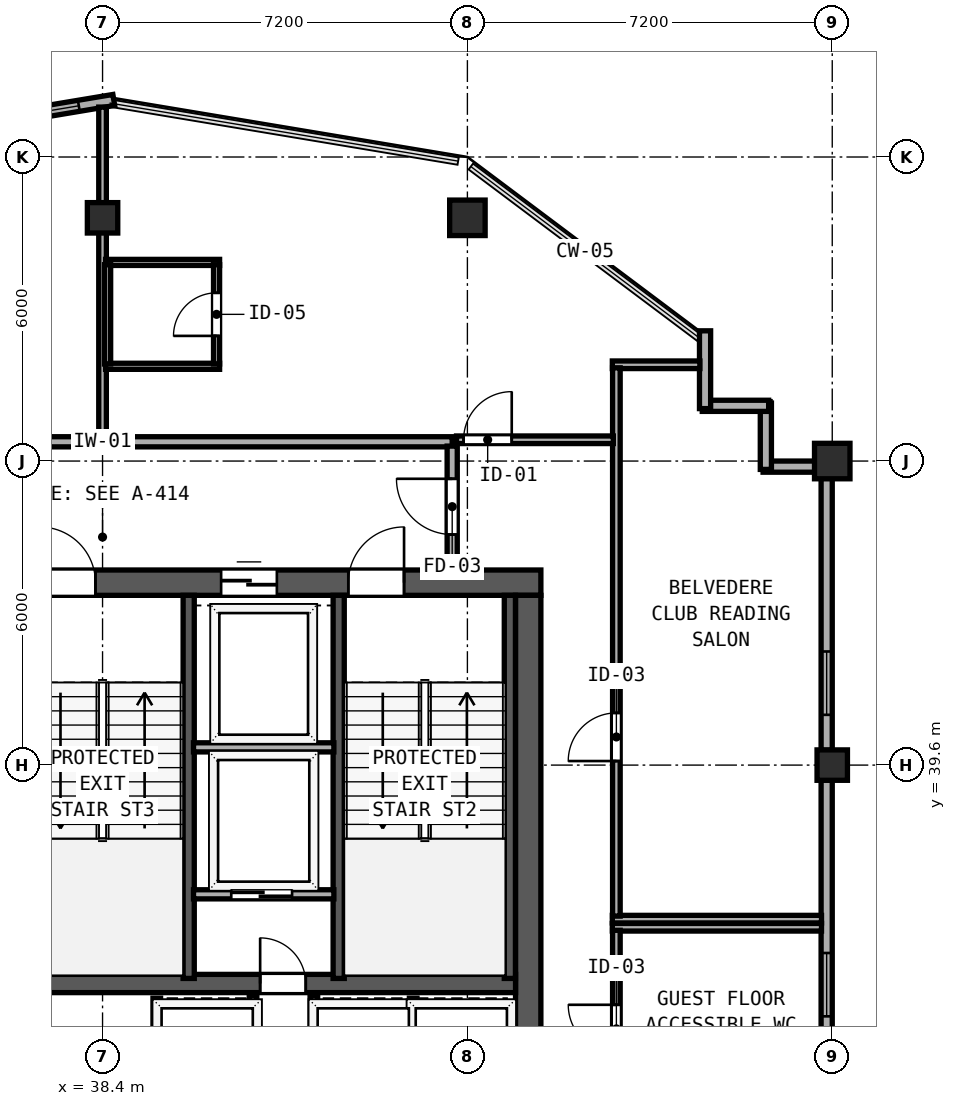
"""IFC4 building model, lengths in metres.
Left out: names, types, materials, properties, quantities, classifications, styles, units other than length and angle.
Written with IfcOpenShell. Run it as: python <this file> out.ifc"""

import sys

from ifc_helpers import new_model, si_unit, direction, frame, frame_2d, origin, origin_2d, place, context, subcontext, project, spatial, rectangle, hollow_rectangle, extrude, element, fill, save


model = new_model("IFC4")
c1 = context("Model", 3, precision=1e-05, world=origin(), true_north=direction((0.0, 1.0)))
c2 = subcontext(c1, "Body", "Model", "MODEL_VIEW")
j1 = project(units=[si_unit("LENGTHUNIT", "METRE"), si_unit("PLANEANGLEUNIT", "RADIAN")], contexts=[c1])
p1 = place(None, origin())
s1 = spatial("IfcSite", under=j1, at=p1, CompositionType="ELEMENT")
p2 = place(p1, origin())
s2 = spatial("IfcBuilding", under=s1, at=p2, CompositionType="ELEMENT")
p3 = place(p2, frame((0.0, 0.0, 301.7)))
s3 = spatial("IfcBuildingStorey", under=s2, at=p3, CompositionType="ELEMENT", Elevation=301.7)
p4 = place(p3, frame((29.75, 43.2, 0.0), z_axis=(0.0, 0.0, 1.0), x_axis=(1.0, 0.0, 0.0)))
e1 = element("IfcWall", 1, at=p4, inside=s3, PredefinedType="SHEAR", context=c2, shape_type="SweptSolid", body=[
    extrude(rectangle(XDim=17.3, YDim=0.5, at=frame_2d((8.65, 0.0))), origin(), (0.0, 0.0, 1.0), 3.72),
])
p5 = place(p4, frame((2.3, 0.0, 0.0)))
e2 = element("IfcOpeningElement", 2, at=p5, cuts=e1, PredefinedType="OPENING", context=c2, shape_type="SweptSolid", body=[
    extrude(rectangle(XDim=1.1, YDim=2.15, at=frame_2d((0.55, 1.075))), frame((0.0, 0.26, 0.0), z_axis=(0.0, -1.0, 0.0), x_axis=(1.0, 0.0, 0.0)), (0.0, 0.0, 1.0), 0.52),
])
p6 = place(p4, frame((7.41, 0.0, 0.0)))
e3 = element("IfcOpeningElement", 3, at=p6, cuts=e1, PredefinedType="OPENING", context=c2, shape_type="SweptSolid", body=[
    extrude(rectangle(XDim=1.1, YDim=2.15, at=frame_2d((0.55, 1.075))), frame((0.0, 0.26, 0.0), z_axis=(0.0, -1.0, 0.0), x_axis=(1.0, 0.0, 0.0)), (0.0, 0.0, 1.0), 0.52),
])
p7 = place(p4, frame((13.5, 0.0, 0.0)))
e4 = element("IfcOpeningElement", 4, at=p7, cuts=e1, PredefinedType="OPENING", context=c2, shape_type="SweptSolid", body=[
    extrude(rectangle(XDim=1.1, YDim=2.15, at=frame_2d((0.55, 1.075))), frame((0.0, 0.26, 0.0), z_axis=(0.0, -1.0, 0.0), x_axis=(1.0, 0.0, 0.0)), (0.0, 0.0, 1.0), 0.52),
])
p8 = place(p4, frame((4.63, 0.0, 0.0)))
e5 = element("IfcOpeningElement", 5, at=p8, cuts=e1, PredefinedType="OPENING", context=c2, shape_type="SweptSolid", body=[
    extrude(rectangle(XDim=1.1, YDim=2.2, at=frame_2d((0.55, 1.1))), frame((0.0, 0.26, 0.0), z_axis=(0.0, -1.0, 0.0), x_axis=(1.0, 0.0, 0.0)), (0.0, 0.0, 1.0), 0.52),
])
p9 = place(p4, frame((10.99, 0.0, 0.0)))
e6 = element("IfcOpeningElement", 6, at=p9, cuts=e1, PredefinedType="OPENING", context=c2, shape_type="SweptSolid", body=[
    extrude(rectangle(XDim=1.1, YDim=2.2, at=frame_2d((0.55, 1.1))), frame((0.0, 0.26, 0.0), z_axis=(0.0, -1.0, 0.0), x_axis=(1.0, 0.0, 0.0)), (0.0, 0.0, 1.0), 0.52),
])
p10 = place(p3, frame((46.8, 32.8, 0.0), z_axis=(0.0, 0.0, 1.0), x_axis=(0.0, 1.0, 0.0)))
e7 = element("IfcWall", 7, at=p10, inside=s3, PredefinedType="SHEAR", context=c2, shape_type="SweptSolid", body=[
    extrude(rectangle(XDim=10.15, YDim=0.5, at=frame_2d((5.075, 0.0))), origin(), (0.0, 0.0, 1.0), 3.72),
])
p11 = place(p3, frame((30.25, 35.29, 0.0), z_axis=(0.0, 0.0, 1.0), x_axis=(1.0, 0.0, 0.0)))
e8 = element("IfcWall", 8, at=p11, inside=s3, PredefinedType="SHEAR", context=c2, shape_type="SweptSolid", body=[
    extrude(rectangle(XDim=16.3, YDim=0.36, at=frame_2d((8.15, 0.0))), origin(), (0.0, 0.0, 1.0), 3.72),
])
p12 = place(p11, frame((5.1, 0.0, 0.0), z_axis=(0.0, 0.0, 1.0), x_axis=(-1.0, 0.0, 0.0)))
e9 = element("IfcOpeningElement", 9, at=p12, cuts=e8, PredefinedType="OPENING", context=c2, shape_type="SweptSolid", body=[
    extrude(rectangle(XDim=0.9, YDim=2.1, at=frame_2d((0.45, 1.05))), frame((0.0, 0.19, 0.0), z_axis=(0.0, -1.0, 0.0), x_axis=(1.0, 0.0, 0.0)), (0.0, 0.0, 1.0), 0.38),
])
p13 = place(p11, frame((12.16, 0.0, 0.0), z_axis=(0.0, 0.0, 1.0), x_axis=(-1.0, 0.0, 0.0)))
e10 = element("IfcOpeningElement", 10, at=p13, cuts=e8, PredefinedType="OPENING", context=c2, shape_type="SweptSolid", body=[
    extrude(rectangle(XDim=0.9, YDim=2.1, at=frame_2d((0.45, 1.05))), frame((0.0, 0.19, 0.0), z_axis=(0.0, -1.0, 0.0), x_axis=(1.0, 0.0, 0.0)), (0.0, 0.0, 1.0), 0.38),
])
for number, where, z_axis, x_axis in (
    (11, (40.1, 35.39, 0.0), (0.0, 0.0, 1.0), (0.0, 1.0, 0.0)),
    (12, (43.06, 35.39, 0.0), (0.0, 0.0, 1.0), (0.0, 1.0, 0.0)),
    (13, (46.438, 35.39, 0.0), (0.0, 0.0, 1.0), (0.0, 1.0, 0.0)),
):
    element("IfcWall", number, at=place(p3, frame(where, z_axis=z_axis, x_axis=x_axis)), inside=s3, PredefinedType="SHEAR", context=c2, shape_type="SweptSolid", body=[
        extrude(rectangle(XDim=7.56, YDim=0.22, at=frame_2d((3.78, 0.0))), origin(), (0.0, 0.0, 1.0), 3.72),
    ])
for number, where, z_axis, x_axis in (
    (14, (52.8, 45.6, 0.0), (0.0, 0.0, 1.0), (1.0, 0.0, 0.0)),
    (15, (45.6, 50.4, 0.0), (0.0, 0.0, 1.0), (1.0, 0.0, 0.0)),
):
    element("IfcColumn", number, at=place(p3, frame(where, z_axis=z_axis, x_axis=x_axis)), inside=s3, PredefinedType="COLUMN", context=c2, shape_type="SweptSolid", body=[
        extrude(hollow_rectangle(XDim=0.7, YDim=0.7, WallThickness=0.026, at=origin_2d()), origin(), (0.0, 0.0, 1.0), 3.9),
    ])
for number, where, z_axis, x_axis in (
    (16, (52.8, 39.6, 0.0), (0.0, 0.0, 1.0), (1.0, 0.0, 0.0)),
    (17, (38.4, 50.4, 0.0), (0.0, 0.0, 1.0), (1.0, 0.0, 0.0)),
):
    element("IfcColumn", number, at=place(p3, frame(where, z_axis=z_axis, x_axis=x_axis)), inside=s3, PredefinedType="COLUMN", context=c2, shape_type="SweptSolid", body=[
        extrude(hollow_rectangle(XDim=0.6, YDim=0.6, WallThickness=0.024, at=origin_2d()), origin(), (0.0, 0.0, 1.0), 3.9),
    ])
p14 = place(p3, frame((52.69, 33.942, 0.0), z_axis=(0.0, 0.0, 1.0), x_axis=(0.0, 1.0, 0.0)))
e18 = element("IfcWall", 18, at=p14, inside=s3, PredefinedType="SOLIDWALL", context=c2, shape_type="SweptSolid", body=[
    extrude(rectangle(XDim=5.366, YDim=0.22, at=frame_2d((2.683, 0.0))), origin(), (0.0, 0.0, 1.0), 3.365),
])
p15 = place(p14, frame((0.7, 0.0, 0.85)))
e19 = element("IfcOpeningElement", 19, at=p15, cuts=e18, PredefinedType="OPENING", context=c2, shape_type="SweptSolid", body=[
    extrude(rectangle(XDim=1.25, YDim=1.95, at=frame_2d((0.625, 0.975))), frame((0.0, 0.12, 0.0), z_axis=(0.0, -1.0, 0.0), x_axis=(1.0, 0.0, 0.0)), (0.0, 0.0, 1.0), 0.24),
])
p16 = place(p3, frame((52.69, 39.892, 0.0), z_axis=(0.0, 0.0, 1.0), x_axis=(0.0, 1.0, 0.0)))
e20 = element("IfcWall", 20, at=p16, inside=s3, PredefinedType="SOLIDWALL", context=c2, shape_type="SweptSolid", body=[
    extrude(rectangle(XDim=5.366, YDim=0.22, at=frame_2d((2.683, 0.0))), origin(), (0.0, 0.0, 1.0), 3.365),
])
p17 = place(p16, frame((0.7, 0.0, 0.85)))
e21 = element("IfcOpeningElement", 21, at=p17, cuts=e20, PredefinedType="OPENING", context=c2, shape_type="SweptSolid", body=[
    extrude(rectangle(XDim=1.25, YDim=1.95, at=frame_2d((0.625, 0.975))), frame((0.0, 0.12, 0.0), z_axis=(0.0, -1.0, 0.0), x_axis=(1.0, 0.0, 0.0)), (0.0, 0.0, 1.0), 0.24),
])
p18 = place(p3, frame((52.458, 45.49, 0.0), z_axis=(0.0, 0.0, 1.0), x_axis=(-1.0, 0.0, 0.0)))
e22 = element("IfcWall", 22, at=p18, inside=s3, PredefinedType="SOLIDWALL", context=c2, shape_type="SweptSolid", body=[
    extrude(rectangle(XDim=1.023, YDim=0.22, at=frame_2d((0.511, 0.0))), origin(), (0.0, 0.0, 1.0), 3.72),
])
p19 = place(p3, frame((51.49, 45.435, 0.0), z_axis=(0.0, 0.0, 1.0), x_axis=(0.0, 1.0, 0.0)))
e23 = element("IfcWall", 23, at=p19, inside=s3, PredefinedType="SOLIDWALL", context=c2, shape_type="SweptSolid", body=[
    extrude(rectangle(XDim=1.31, YDim=0.22, at=frame_2d((0.655, 0.0))), origin(), (0.0, 0.0, 1.0), 3.72),
])
p20 = place(p3, frame((51.545, 46.69, 0.0), z_axis=(0.0, 0.0, 1.0), x_axis=(-1.0, 0.0, 0.0)))
e24 = element("IfcWall", 24, at=p20, inside=s3, PredefinedType="SOLIDWALL", context=c2, shape_type="SweptSolid", body=[
    extrude(rectangle(XDim=1.31, YDim=0.22, at=frame_2d((0.655, 0.0))), origin(), (0.0, 0.0, 1.0), 3.72),
])
p21 = place(p3, frame((50.29, 46.635, 0.0), z_axis=(0.0, 0.0, 1.0), x_axis=(0.0, 1.0, 0.0)))
e25 = element("IfcWall", 25, at=p21, inside=s3, PredefinedType="SOLIDWALL", context=c2, shape_type="SweptSolid", body=[
    extrude(rectangle(XDim=1.535, YDim=0.22, at=frame_2d((0.768, 0.0))), origin(), (0.0, 0.0, 1.0), 3.72),
])
p22 = place(p3, frame((38.622, 52.726, 0.0), z_axis=(0.0, 0.0, 1.0), x_axis=(-0.986390420428, -0.164420006349, 0.0)))
e26 = element("IfcWall", 26, at=p22, inside=s3, PredefinedType="SOLIDWALL", context=c2, shape_type="SweptSolid", body=[
    extrude(rectangle(XDim=7.534, YDim=0.22, at=frame_2d((3.767, 0.0))), origin(), (0.0, 0.0, 1.0), 3.72),
])
p23 = place(p22, frame((0.7, 0.0, 0.85)))
e27 = element("IfcOpeningElement", 27, at=p23, cuts=e26, PredefinedType="OPENING", context=c2, shape_type="SweptSolid", body=[
    extrude(rectangle(XDim=1.25, YDim=1.95, at=frame_2d((0.625, 0.975))), frame((0.0, 0.12, 0.0), z_axis=(0.0, -1.0, 0.0), x_axis=(1.0, 0.0, 0.0)), (0.0, 0.0, 1.0), 0.24),
])
p24 = place(p3, frame((31.5, 45.98, 0.0), z_axis=(0.0, 0.0, 1.0), x_axis=(1.0, 0.0, 0.0)))
e28 = element("IfcWall", 28, at=p24, inside=s3, PredefinedType="SOLIDWALL", context=c2, shape_type="SweptSolid", body=[
    extrude(rectangle(XDim=13.8, YDim=0.2, at=frame_2d((6.9, 0.0))), origin(), (0.0, 0.0, 1.0), 3.72),
])
p25 = place(p3, frame((45.3, 43.45, 0.0), z_axis=(0.0, 0.0, 1.0), x_axis=(0.0, 1.0, 0.0)))
e29 = element("IfcWall", 29, at=p25, inside=s3, PredefinedType="SOLIDWALL", context=c2, shape_type="SweptSolid", body=[
    extrude(rectangle(XDim=2.445, YDim=0.2, at=frame_2d((1.223, 0.0))), origin(), (0.0, 0.0, 1.0), 3.72),
])
p26 = place(p25, frame((0.7, 0.0, 0.0)))
e30 = element("IfcOpeningElement", 30, at=p26, cuts=e29, PredefinedType="OPENING", context=c2, shape_type="SweptSolid", body=[
    extrude(rectangle(XDim=1.1, YDim=2.15, at=frame_2d((0.55, 1.075))), frame((0.0, 0.11, 0.0), z_axis=(0.0, -1.0, 0.0), x_axis=(1.0, 0.0, 0.0)), (0.0, 0.0, 1.0), 0.22),
])
p27 = place(p3, frame((40.195, 39.95, 0.0), z_axis=(0.0, 0.0, 1.0), x_axis=(1.0, 0.0, 0.0)))
e31 = element("IfcWall", 31, at=p27, inside=s3, PredefinedType="SOLIDWALL", context=c2, shape_type="SweptSolid", body=[
    extrude(rectangle(XDim=2.77, YDim=0.18, at=frame_2d((1.385, 0.0))), origin(), (0.0, 0.0, 1.0), 3.72),
])
p28 = place(p3, frame((40.195, 37.05, 0.0), z_axis=(0.0, 0.0, 1.0), x_axis=(1.0, 0.0, 0.0)))
e32 = element("IfcWall", 32, at=p28, inside=s3, PredefinedType="SOLIDWALL", context=c2, shape_type="SweptSolid", body=[
    extrude(rectangle(XDim=2.77, YDim=0.18, at=frame_2d((1.385, 0.0))), origin(), (0.0, 0.0, 1.0), 3.72),
])
p29 = place(p28, frame((1.945, 0.0, 0.0), z_axis=(0.0, 0.0, 1.0), x_axis=(-1.0, 0.0, 0.0)))
e33 = element("IfcOpeningElement", 33, at=p29, cuts=e32, PredefinedType="OPENING", context=c2, shape_type="SweptSolid", body=[
    extrude(rectangle(XDim=1.2, YDim=2.2, at=frame_2d((0.6, 1.1))), frame((0.0, 0.1, 0.0), z_axis=(0.0, -1.0, 0.0), x_axis=(1.0, 0.0, 0.0)), (0.0, 0.0, 1.0), 0.2),
])
for number, where, z_axis, x_axis in (
    (34, (41.37, 32.88, 0.0), (0.0, 0.0, 1.0), (0.0, 1.0, 0.0)),
    (35, (42.57, 32.88, 0.0), (0.0, 0.0, 1.0), (0.0, 1.0, 0.0)),
):
    element("IfcWall", number, at=place(p3, frame(where, z_axis=z_axis, x_axis=x_axis)), inside=s3, PredefinedType="SOLIDWALL", context=c2, shape_type="SweptSolid", body=[
        extrude(rectangle(XDim=2.17, YDim=0.15, at=frame_2d((1.085, 0.0))), origin(), (0.0, 0.0, 1.0), 3.72),
    ])
for number, where, z_axis, x_axis in (
    (36, (39.47, 32.95, 0.0), (0.0, 0.0, 1.0), (0.0, 1.0, 0.0)),
    (37, (44.53, 32.95, 0.0), (0.0, 0.0, 1.0), (0.0, 1.0, 0.0)),
):
    element("IfcWall", number, at=place(p3, frame(where, z_axis=z_axis, x_axis=x_axis)), inside=s3, PredefinedType="SOLIDWALL", context=c2, shape_type="SweptSolid", body=[
        extrude(rectangle(XDim=2.05, YDim=0.15, at=frame_2d((1.025, 0.0))), origin(), (0.0, 0.0, 1.0), 3.72),
    ])
p30 = place(p3, frame((48.46, 36.4, 0.0), z_axis=(0.0, 0.0, 1.0), x_axis=(1.0, 0.0, 0.0)))
e38 = element("IfcWall", 38, at=p30, inside=s3, PredefinedType="PARTITIONING", context=c2, shape_type="SweptSolid", body=[
    extrude(rectangle(XDim=4.128, YDim=0.15, at=frame_2d((2.064, 0.0))), origin(), (0.0, 0.0, 1.0), 3.72),
])
p31 = place(p3, frame((48.54, 33.06, 0.0), z_axis=(0.0, 0.0, 1.0), x_axis=(0.0, 1.0, 0.0)))
e39 = element("IfcWall", 39, at=p31, inside=s3, PredefinedType="PARTITIONING", context=c2, shape_type="SweptSolid", body=[
    extrude(rectangle(XDim=3.28, YDim=0.15, at=frame_2d((1.64, 0.0))), origin(), (0.0, 0.0, 1.0), 3.72),
])
p32 = place(p31, frame((0.86, 0.0, 0.0)))
e40 = element("IfcOpeningElement", 40, at=p32, cuts=e39, PredefinedType="OPENING", context=c2, shape_type="SweptSolid", body=[
    extrude(rectangle(XDim=0.95, YDim=2.12, at=frame_2d((0.475, 1.06))), frame((0.0, 0.085, 0.0), z_axis=(0.0, -1.0, 0.0), x_axis=(1.0, 0.0, 0.0)), (0.0, 0.0, 1.0), 0.17),
])
p33 = place(p3, frame((48.46, 47.5, 0.0), z_axis=(0.0, 0.0, 1.0), x_axis=(1.0, 0.0, 0.0)))
e41 = element("IfcWall", 41, at=p33, inside=s3, PredefinedType="PARTITIONING", context=c2, shape_type="SweptSolid", body=[
    extrude(rectangle(XDim=1.728, YDim=0.15, at=frame_2d((0.864, 0.0))), origin(), (0.0, 0.0, 1.0), 3.72),
])
p34 = place(p3, frame((48.46, 36.56, 0.0), z_axis=(0.0, 0.0, 1.0), x_axis=(1.0, 0.0, 0.0)))
e42 = element("IfcWall", 42, at=p34, inside=s3, PredefinedType="PARTITIONING", context=c2, shape_type="SweptSolid", body=[
    extrude(rectangle(XDim=4.128, YDim=0.15, at=frame_2d((2.064, 0.0))), origin(), (0.0, 0.0, 1.0), 3.72),
])
p35 = place(p3, frame((48.54, 36.62, 0.0), z_axis=(0.0, 0.0, 1.0), x_axis=(0.0, 1.0, 0.0)))
e43 = element("IfcWall", 43, at=p35, inside=s3, PredefinedType="PARTITIONING", context=c2, shape_type="SweptSolid", body=[
    extrude(rectangle(XDim=10.82, YDim=0.15, at=frame_2d((5.41, 0.0))), origin(), (0.0, 0.0, 1.0), 3.72),
])
p36 = place(p35, frame((3.06, 0.0, 0.0)))
e44 = element("IfcOpeningElement", 44, at=p36, cuts=e43, PredefinedType="OPENING", context=c2, shape_type="SweptSolid", body=[
    extrude(rectangle(XDim=0.95, YDim=2.12, at=frame_2d((0.475, 1.06))), frame((0.0, 0.085, 0.0), z_axis=(0.0, -1.0, 0.0), x_axis=(1.0, 0.0, 0.0)), (0.0, 0.0, 1.0), 0.17),
])
p37 = place(p3, frame((38.4, 46.065, 0.0), z_axis=(0.0, 0.0, 1.0), x_axis=(0.0, 1.0, 0.0)))
e45 = element("IfcWall", 45, at=p37, inside=s3, PredefinedType="PARTITIONING", context=c2, shape_type="SweptSolid", body=[
    extrude(rectangle(XDim=6.52, YDim=0.15, at=frame_2d((3.26, 0.0))), origin(), (0.0, 0.0, 1.0), 3.72),
])
p38 = place(p3, frame((45.385, 46.02, 0.0), z_axis=(0.0, 0.0, 1.0), x_axis=(1.0, 0.0, 0.0)))
e46 = element("IfcWall", 46, at=p38, inside=s3, PredefinedType="PARTITIONING", context=c2, shape_type="SweptSolid", body=[
    extrude(rectangle(XDim=3.095, YDim=0.15, at=frame_2d((1.547, 0.0))), origin(), (0.0, 0.0, 1.0), 3.72),
])
p39 = place(p38, frame((0.14, 0.0, 0.0)))
e47 = element("IfcOpeningElement", 47, at=p39, cuts=e46, PredefinedType="OPENING", context=c2, shape_type="SweptSolid", body=[
    extrude(rectangle(XDim=0.95, YDim=2.18, at=frame_2d((0.475, 1.09))), frame((0.0, 0.085, 0.0), z_axis=(0.0, -1.0, 0.0), x_axis=(1.0, 0.0, 0.0)), (0.0, 0.0, 1.0), 0.17),
])
for number, where, z_axis, x_axis in (
    (48, (38.46, 49.52, 0.0), (0.0, 0.0, 1.0), (1.0, 0.0, 0.0)),
    (49, (38.46, 47.47, 0.0), (0.0, 0.0, 1.0), (1.0, 0.0, 0.0)),
):
    element("IfcWall", number, at=place(p3, frame(where, z_axis=z_axis, x_axis=x_axis)), inside=s3, PredefinedType="PARTITIONING", context=c2, shape_type="SweptSolid", body=[
        extrude(rectangle(XDim=2.25, YDim=0.12, at=frame_2d((1.125, 0.0))), origin(), (0.0, 0.0, 1.0), 3.72),
    ])
p40 = place(p3, frame((38.5, 47.515, 0.0), z_axis=(0.0, 0.0, 1.0), x_axis=(0.0, 1.0, 0.0)))
e50 = element("IfcWall", 50, at=p40, inside=s3, PredefinedType="PARTITIONING", context=c2, shape_type="SweptSolid", body=[
    extrude(rectangle(XDim=1.96, YDim=0.12, at=frame_2d((0.98, 0.0))), origin(), (0.0, 0.0, 1.0), 3.72),
])
p41 = place(p3, frame((40.65, 47.515, 0.0), z_axis=(0.0, 0.0, 1.0), x_axis=(0.0, 1.0, 0.0)))
e51 = element("IfcWall", 51, at=p41, inside=s3, PredefinedType="PARTITIONING", context=c2, shape_type="SweptSolid", body=[
    extrude(rectangle(XDim=1.96, YDim=0.12, at=frame_2d((0.98, 0.0))), origin(), (0.0, 0.0, 1.0), 3.72),
])
p42 = place(p41, frame((0.555, 0.0, 0.0)))
e52 = element("IfcOpeningElement", 52, at=p42, cuts=e51, PredefinedType="OPENING", context=c2, shape_type="SweptSolid", body=[
    extrude(rectangle(XDim=0.85, YDim=2.1, at=frame_2d((0.425, 1.05))), frame((0.0, 0.07, 0.0), z_axis=(0.0, -1.0, 0.0), x_axis=(1.0, 0.0, 0.0)), (0.0, 0.0, 1.0), 0.14),
])
p43 = place(p15, origin())
e53 = element("IfcWindow", 53, at=p43, inside=s3, PartitioningType="SINGLE_PANEL", PredefinedType="WINDOW", context=c2, shape_type="SweptSolid", body=[
    extrude(rectangle(XDim=1.25, YDim=1.95, at=frame_2d((0.625, 0.975))), frame((0.0, 0.03, 0.0), z_axis=(0.0, -1.0, 0.0), x_axis=(1.0, 0.0, 0.0)), (0.0, 0.0, 1.0), 0.06),
])
fill(e19, e53)
p44 = place(p17, origin())
e54 = element("IfcWindow", 54, at=p44, inside=s3, PartitioningType="SINGLE_PANEL", PredefinedType="WINDOW", context=c2, shape_type="SweptSolid", body=[
    extrude(rectangle(XDim=1.25, YDim=1.95, at=frame_2d((0.625, 0.975))), frame((0.0, 0.03, 0.0), z_axis=(0.0, -1.0, 0.0), x_axis=(1.0, 0.0, 0.0)), (0.0, 0.0, 1.0), 0.06),
])
fill(e21, e54)
p45 = place(p23, origin())
e55 = element("IfcWindow", 55, at=p45, inside=s3, PartitioningType="SINGLE_PANEL", PredefinedType="WINDOW", context=c2, shape_type="SweptSolid", body=[
    extrude(rectangle(XDim=1.25, YDim=1.95, at=frame_2d((0.625, 0.975))), frame((0.0, 0.03, 0.0), z_axis=(0.0, -1.0, 0.0), x_axis=(1.0, 0.0, 0.0)), (0.0, 0.0, 1.0), 0.06),
])
fill(e27, e55)
p46 = place(p6, origin())
e56 = element("IfcDoor", 56, at=p46, inside=s3, OperationType="SINGLE_SWING_LEFT", PredefinedType="DOOR", context=c2, shape_type="SweptSolid", body=[
    extrude(rectangle(XDim=1.1, YDim=2.15, at=frame_2d((0.55, 1.075))), frame((0.0, 0.185, 0.0), z_axis=(0.0, -1.0, 0.0), x_axis=(1.0, 0.0, 0.0)), (0.0, 0.0, 1.0), 0.05),
])
fill(e3, e56)
p47 = place(p7, origin())
e57 = element("IfcDoor", 57, at=p47, inside=s3, OperationType="SINGLE_SWING_RIGHT", PredefinedType="DOOR", context=c2, shape_type="SweptSolid", body=[
    extrude(rectangle(XDim=1.1, YDim=2.15, at=frame_2d((0.55, 1.075))), frame((0.0, 0.185, 0.0), z_axis=(0.0, -1.0, 0.0), x_axis=(1.0, 0.0, 0.0)), (0.0, 0.0, 1.0), 0.05),
])
fill(e4, e57)
p48 = place(p26, origin())
e58 = element("IfcDoor", 58, at=p48, inside=s3, OperationType="SINGLE_SWING_RIGHT", PredefinedType="DOOR", context=c2, shape_type="SweptSolid", body=[
    extrude(rectangle(XDim=1.1, YDim=2.15, at=frame_2d((0.55, 1.075))), frame((0.0, 0.025, 0.0), z_axis=(0.0, -1.0, 0.0), x_axis=(1.0, 0.0, 0.0)), (0.0, 0.0, 1.0), 0.05),
])
fill(e30, e58)
p49 = place(p9, origin())
e59 = element("IfcDoor", 59, at=p49, inside=s3, OperationType="SLIDING_TO_LEFT", PredefinedType="DOOR", context=c2, shape_type="SweptSolid", body=[
    extrude(rectangle(XDim=1.1, YDim=2.2, at=frame_2d((0.55, 1.1))), frame((0.0, 0.185, 0.0), z_axis=(0.0, -1.0, 0.0), x_axis=(1.0, 0.0, 0.0)), (0.0, 0.0, 1.0), 0.05),
])
fill(e6, e59)
p50 = place(p29, origin())
e60 = element("IfcDoor", 60, at=p50, inside=s3, OperationType="SLIDING_TO_RIGHT", PredefinedType="DOOR", context=c2, shape_type="SweptSolid", body=[
    extrude(rectangle(XDim=1.2, YDim=2.2, at=frame_2d((0.6, 1.1))), frame((0.0, 0.025, 0.0), z_axis=(0.0, -1.0, 0.0), x_axis=(1.0, 0.0, 0.0)), (0.0, 0.0, 1.0), 0.05),
])
fill(e33, e60)
p51 = place(p13, origin())
e61 = element("IfcDoor", 61, at=p51, inside=s3, OperationType="SINGLE_SWING_RIGHT", PredefinedType="DOOR", context=c2, shape_type="SweptSolid", body=[
    extrude(rectangle(XDim=0.9, YDim=2.1, at=frame_2d((0.45, 1.05))), frame((0.0, 0.025, 0.0), z_axis=(0.0, -1.0, 0.0), x_axis=(1.0, 0.0, 0.0)), (0.0, 0.0, 1.0), 0.05),
])
fill(e10, e61)
p52 = place(p32, origin())
e62 = element("IfcDoor", 62, at=p52, inside=s3, OperationType="SINGLE_SWING_RIGHT", PredefinedType="DOOR", context=c2, shape_type="SweptSolid", body=[
    extrude(rectangle(XDim=0.95, YDim=2.12, at=frame_2d((0.475, 1.06))), frame((0.0, 0.025, 0.0), z_axis=(0.0, -1.0, 0.0), x_axis=(1.0, 0.0, 0.0)), (0.0, 0.0, 1.0), 0.05),
])
fill(e40, e62)
p53 = place(p36, origin())
e63 = element("IfcDoor", 63, at=p53, inside=s3, OperationType="SINGLE_SWING_LEFT", PredefinedType="DOOR", context=c2, shape_type="SweptSolid", body=[
    extrude(rectangle(XDim=0.95, YDim=2.12, at=frame_2d((0.475, 1.06))), frame((0.0, 0.025, 0.0), z_axis=(0.0, -1.0, 0.0), x_axis=(1.0, 0.0, 0.0)), (0.0, 0.0, 1.0), 0.05),
])
fill(e44, e63)
p54 = place(p39, origin())
e64 = element("IfcDoor", 64, at=p54, inside=s3, OperationType="SINGLE_SWING_RIGHT", PredefinedType="DOOR", context=c2, shape_type="SweptSolid", body=[
    extrude(rectangle(XDim=0.95, YDim=2.18, at=frame_2d((0.475, 1.09))), frame((0.0, 0.025, 0.0), z_axis=(0.0, -1.0, 0.0), x_axis=(1.0, 0.0, 0.0)), (0.0, 0.0, 1.0), 0.05),
])
fill(e47, e64)
p55 = place(p42, origin())
e65 = element("IfcDoor", 65, at=p55, inside=s3, OperationType="SINGLE_SWING_LEFT", PredefinedType="DOOR", context=c2, shape_type="SweptSolid", body=[
    extrude(rectangle(XDim=0.85, YDim=2.1, at=frame_2d((0.425, 1.05))), frame((0.0, 0.025, 0.0), z_axis=(0.0, -1.0, 0.0), x_axis=(1.0, 0.0, 0.0)), (0.0, 0.0, 1.0), 0.05),
])
fill(e52, e65)
save(model, sys.argv[1])
